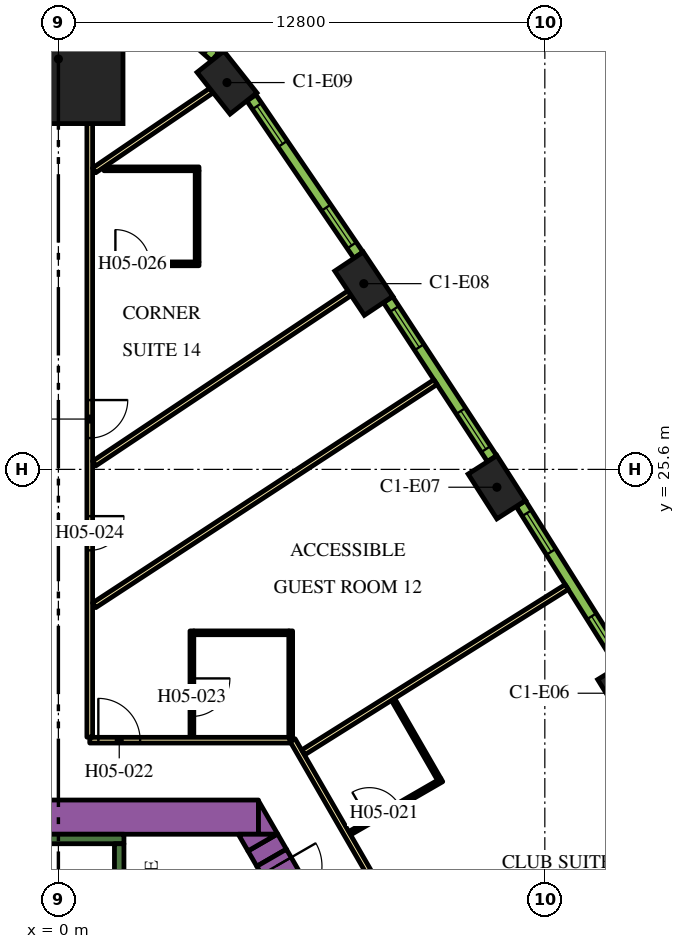
"""IFC4 building model, lengths in metres.
Left out: names, types, materials, properties, quantities, classifications, styles, units other than length and angle.
Written with IfcOpenShell. Run it as: python <this file> out.ifc"""

import sys

from ifc_helpers import new_model, si_unit, direction, frame, frame_2d, origin, origin_2d, place, context, subcontext, project, spatial, polyline, rectangle, outline, extrude, element, fill, save


model = new_model("IFC4")
c1 = context("Model", 3, precision=1e-05, world=origin(), true_north=direction((0.0, 1.0)))
c2 = subcontext(c1, "Body", "Model", "MODEL_VIEW")
j1 = project(units=[si_unit("LENGTHUNIT", "METRE"), si_unit("PLANEANGLEUNIT", "RADIAN")], contexts=[c1])
p1 = place(None, origin())
s1 = spatial("IfcSite", under=j1, at=p1, CompositionType="ELEMENT")
p2 = place(p1, origin())
s2 = spatial("IfcBuilding", under=s1, at=p2, CompositionType="ELEMENT")
p3 = place(p2, frame((0.0, 0.0, 74.4)))
s3 = spatial("IfcBuildingStorey", under=s2, at=p3, CompositionType="ELEMENT", Elevation=74.4)
p4 = place(p3, frame((0.0, 36.399, 0.0), z_axis=(0.0, 0.0, 1.0), x_axis=(0.0, 1.0, 0.0)))
e1 = element("IfcColumn", 1, at=p4, inside=s3, PredefinedType="COLUMN", context=c2, shape_type="SweptSolid", body=[
    extrude(rectangle(XDim=3.4, YDim=3.4, at=origin_2d()), origin(), (0.0, 0.0, 1.0), 3.9),
])
for number, where, z_axis, x_axis in (
    (2, (14.942, 19.71, 0.0), (0.0, 0.0, 1.0), (-0.524, 0.852, 0.0)),
    (3, (11.539, 25.131, 0.0), (0.0, 0.0, 1.0), (-0.539, 0.842, 0.0)),
    (4, (8.037, 30.487, 0.0), (0.0, 0.0, 1.0), (-0.555, 0.832, 0.0)),
    (5, (4.436, 35.778, 0.0), (0.0, 0.0, 1.0), (-0.62, 0.784, 0.0)),
):
    element("IfcColumn", number, at=place(p3, frame(where, z_axis=z_axis, x_axis=x_axis)), inside=s3, PredefinedType="COLUMN", context=c2, shape_type="SweptSolid", body=[
        extrude(rectangle(XDim=1.4, YDim=0.9, at=origin_2d()), origin(), (0.0, 0.0, 1.0), 3.9),
    ])
p5 = place(p3, frame((-4.224, 16.45, 0.0), z_axis=(0.0, 0.0, 1.0), x_axis=(1.0, 0.0, 0.0)))
e6 = element("IfcWall", 6, at=p5, inside=s3, PredefinedType="SOLIDWALL", context=c2, shape_type="SweptSolid", body=[
    extrude(rectangle(XDim=9.488, YDim=0.9, at=frame_2d((4.744, 0.0))), origin(), (0.0, 0.0, 1.0), 3.9),
])
p6 = place(p3, origin())
e7 = element("IfcWall", 7, at=p6, inside=s3, PredefinedType="SOLIDWALL", context=c2, shape_type="SweptSolid", body=[
    extrude(outline(polyline([(5.265, 16.0), (5.265, 16.88), (5.773, 16.0), (5.265, 16.0)])), origin(), (0.0, 0.0, 1.0), 3.9),
])
p7 = place(p3, frame((5.611, 15.382, 0.0), z_axis=(0.0, 0.0, 1.0), x_axis=(-0.500102178127, 0.865966403178, 0.0)))
e8 = element("IfcWall", 8, at=p7, inside=s3, PredefinedType="SOLIDWALL", context=c2, shape_type="SweptSolid", body=[
    extrude(rectangle(XDim=0.464, YDim=0.9, at=frame_2d((0.232, 0.0))), origin(), (0.0, 0.0, 1.0), 3.9),
])
e9 = element("IfcWall", 9, at=p6, inside=s3, PredefinedType="SOLIDWALL", context=c2, shape_type="SweptSolid", body=[
    extrude(outline(polyline([(4.734, 16.0), (5.75, 16.0), (4.988, 15.56), (4.734, 16.0)])), origin(), (0.0, 0.0, 1.0), 3.9),
])
p8 = place(p3, frame((-1.725, 15.875, 0.0), z_axis=(0.0, 0.0, 1.0), x_axis=(1.0, 0.0, 0.0)))
e10 = element("IfcWall", 10, at=p8, inside=s3, PredefinedType="SOLIDWALL", context=c2, shape_type="SweptSolid", body=[
    extrude(rectangle(XDim=3.45, YDim=0.25, at=frame_2d((1.725, 0.0))), origin(), (0.0, 0.0, 1.0), 3.9),
])
p9 = place(p3, frame((1.6, 8.95, 0.0), z_axis=(0.0, 0.0, 1.0), x_axis=(0.0, 1.0, 0.0)))
e11 = element("IfcWall", 11, at=p9, inside=s3, PredefinedType="SOLIDWALL", context=c2, shape_type="SweptSolid", body=[
    extrude(rectangle(XDim=6.8, YDim=0.25, at=frame_2d((3.4, 0.0))), origin(), (0.0, 0.0, 1.0), 3.9),
])
p10 = place(p3, frame((5.611, 15.382, 0.0), z_axis=(0.0, 0.0, 1.0), x_axis=(0.500062241894, -0.865989465428, 0.0)))
e12 = element("IfcWall", 12, at=p10, inside=s3, PredefinedType="SOLIDWALL", context=c2, shape_type="SweptSolid", body=[
    extrude(rectangle(XDim=1.7, YDim=0.9, at=frame_2d((0.85, 0.0))), origin(), (0.0, 0.0, 1.0), 3.9),
])
p11 = place(p10, frame((0.25, 0.0, 0.0)))
e13 = element("IfcOpeningElement", 13, at=p11, cuts=e12, PredefinedType="OPENING", context=c2, shape_type="SweptSolid", body=[
    extrude(rectangle(XDim=1.2, YDim=2.1, at=frame_2d((0.6, 1.05))), frame((0.0, 0.46, 0.0), z_axis=(0.0, -1.0, 0.0), x_axis=(1.0, 0.0, 0.0)), (0.0, 0.0, 1.0), 0.92),
])
p12 = place(p3, frame((6.163, 18.475, 0.0), z_axis=(0.0, 0.0, 1.0), x_axis=(0.500001317485, -0.866024643133, 0.0)))
e14 = element("IfcWall", 14, at=p12, inside=s3, PredefinedType="PARTITIONING", context=c2, shape_type="SweptSolid", body=[
    extrude(rectangle(XDim=25.767, YDim=0.15, at=frame_2d((12.883, 0.0))), origin(), (0.0, 0.0, 1.0), 2.7),
])
p13 = place(p12, frame((21.953, 0.0, 0.0)))
e15 = element("IfcOpeningElement", 15, at=p13, cuts=e14, PredefinedType="OPENING", context=c2, shape_type="SweptSolid", body=[
    extrude(rectangle(XDim=1.0, YDim=2.1, at=frame_2d((0.5, 1.05))), frame((0.0, 0.085, 0.0), z_axis=(0.0, -1.0, 0.0), x_axis=(1.0, 0.0, 0.0)), (0.0, 0.0, 1.0), 0.17),
])
p14 = place(p12, frame((9.948, 0.0, 0.0)))
e16 = element("IfcOpeningElement", 16, at=p14, cuts=e14, PredefinedType="OPENING", context=c2, shape_type="SweptSolid", body=[
    extrude(rectangle(XDim=1.0, YDim=2.1, at=frame_2d((0.5, 1.05))), frame((0.0, 0.085, 0.0), z_axis=(0.0, -1.0, 0.0), x_axis=(1.0, 0.0, 0.0)), (0.0, 0.0, 1.0), 0.17),
])
p15 = place(p12, frame((8.641, 0.0, 0.0)))
e17 = element("IfcOpeningElement", 17, at=p15, cuts=e14, PredefinedType="OPENING", context=c2, shape_type="SweptSolid", body=[
    extrude(rectangle(XDim=1.0, YDim=2.1, at=frame_2d((0.5, 1.05))), frame((0.0, 0.085, 0.0), z_axis=(0.0, -1.0, 0.0), x_axis=(1.0, 0.0, 0.0)), (0.0, 0.0, 1.0), 0.17),
])
p16 = place(p3, frame((0.825, 18.475, 0.0), z_axis=(0.0, 0.0, 1.0), x_axis=(1.0, 0.0, 0.0)))
e18 = element("IfcWall", 18, at=p16, inside=s3, PredefinedType="PARTITIONING", context=c2, shape_type="SweptSolid", body=[
    extrude(rectangle(XDim=5.268, YDim=0.15, at=frame_2d((2.634, 0.0))), origin(), (0.0, 0.0, 1.0), 2.7),
])
p17 = place(p16, frame((0.226, 0.0, 0.0)))
e19 = element("IfcOpeningElement", 19, at=p17, cuts=e18, PredefinedType="OPENING", context=c2, shape_type="SweptSolid", body=[
    extrude(rectangle(XDim=1.1, YDim=2.1, at=frame_2d((0.55, 1.05))), frame((0.0, 0.085, 0.0), z_axis=(0.0, -1.0, 0.0), x_axis=(1.0, 0.0, 0.0)), (0.0, 0.0, 1.0), 0.17),
])
p18 = place(p3, frame((0.825, 34.699, 0.0), z_axis=(0.0, 0.0, 1.0), x_axis=(0.0, -1.0, 0.0)))
e20 = element("IfcWall", 20, at=p18, inside=s3, PredefinedType="PARTITIONING", context=c2, shape_type="SweptSolid", body=[
    extrude(rectangle(XDim=16.144, YDim=0.15, at=frame_2d((8.072, 0.0))), origin(), (0.0, 0.0, 1.0), 2.7),
])
p19 = place(p18, frame((10.329, 0.0, 0.0)))
e21 = element("IfcOpeningElement", 21, at=p19, cuts=e20, PredefinedType="OPENING", context=c2, shape_type="SweptSolid", body=[
    extrude(rectangle(XDim=0.9, YDim=2.1, at=frame_2d((0.45, 1.05))), frame((0.0, 0.085, 0.0), z_axis=(0.0, -1.0, 0.0), x_axis=(1.0, 0.0, 0.0)), (0.0, 0.0, 1.0), 0.17),
])
p20 = place(p18, frame((7.275, 0.0, 0.0)))
e22 = element("IfcOpeningElement", 22, at=p20, cuts=e20, PredefinedType="OPENING", context=c2, shape_type="SweptSolid", body=[
    extrude(rectangle(XDim=1.0, YDim=2.1, at=frame_2d((0.5, 1.05))), frame((0.0, 0.085, 0.0), z_axis=(0.0, -1.0, 0.0), x_axis=(1.0, 0.0, 0.0)), (0.0, 0.0, 1.0), 0.17),
])
p21 = place(p3, frame((9.922, 27.896, 0.0), z_axis=(0.0, 0.0, 1.0), x_axis=(-0.836970816595, -0.547247523675, 0.0)))
e23 = element("IfcWall", 23, at=p21, inside=s3, PredefinedType="PARTITIONING", context=c2, shape_type="SweptSolid", body=[
    extrude(rectangle(XDim=10.729, YDim=0.15, at=frame_2d((5.364, 0.0))), origin(), (0.0, 0.0, 1.0), 2.7),
])
p22 = place(p3, frame((7.662, 30.238, 0.0), z_axis=(0.0, 0.0, 1.0), x_axis=(-0.831882886825, -0.554951225431, 0.0)))
e24 = element("IfcWall", 24, at=p22, inside=s3, PredefinedType="PARTITIONING", context=c2, shape_type="SweptSolid", body=[
    extrude(rectangle(XDim=8.079, YDim=0.15, at=frame_2d((4.04, 0.0))), origin(), (0.0, 0.0, 1.0), 2.7),
])
p23 = place(p3, frame((4.028, 35.569, 0.0), z_axis=(0.0, 0.0, 1.0), x_axis=(-0.826700206326, -0.56264266534, 0.0)))
e25 = element("IfcWall", 25, at=p23, inside=s3, PredefinedType="PARTITIONING", context=c2, shape_type="SweptSolid", body=[
    extrude(rectangle(XDim=3.733, YDim=0.15, at=frame_2d((1.867, 0.0))), origin(), (0.0, 0.0, 1.0), 2.7),
])
p24 = place(p3, frame((13.376, 22.506, 0.0), z_axis=(0.0, 0.0, 1.0), x_axis=(-0.846945608893, -0.531679542183, 0.0)))
e26 = element("IfcWall", 26, at=p24, inside=s3, PredefinedType="PARTITIONING", context=c2, shape_type="SweptSolid", body=[
    extrude(rectangle(XDim=8.182, YDim=0.15, at=frame_2d((4.091, 0.0))), origin(), (0.0, 0.0, 1.0), 2.7),
])
p25 = place(p3, frame((7.664, 16.026, 0.0), z_axis=(0.0, 0.0, 1.0), x_axis=(0.866034573852, 0.49998411664, 0.0)))
e27 = element("IfcWall", 27, at=p25, inside=s3, PredefinedType="PARTITIONING", context=c2, shape_type="SweptSolid", body=[
    extrude(rectangle(XDim=2.8, YDim=0.1, at=frame_2d((1.4, 0.0))), origin(), (0.0, 0.0, 1.0), 2.7),
])
p26 = place(p25, frame((0.6, 0.0, 0.0)))
e28 = element("IfcOpeningElement", 28, at=p26, cuts=e27, PredefinedType="OPENING", context=c2, shape_type="SweptSolid", body=[
    extrude(rectangle(XDim=0.9, YDim=2.1, at=frame_2d((0.45, 1.05))), frame((0.0, 0.06, 0.0), z_axis=(0.0, -1.0, 0.0), x_axis=(1.0, 0.0, 0.0)), (0.0, 0.0, 1.0), 0.12),
])
p27 = place(p3, frame((10.02, 17.444, 0.0), z_axis=(0.0, 0.0, 1.0), x_axis=(-0.499958230738, 0.866049517936, 0.0)))
e29 = element("IfcWall", 29, at=p27, inside=s3, PredefinedType="PARTITIONING", context=c2, shape_type="SweptSolid", body=[
    extrude(rectangle(XDim=2.42, YDim=0.1, at=frame_2d((1.21, 0.0))), origin(), (0.0, 0.0, 1.0), 2.7),
])
p28 = place(p3, frame((3.513, 21.35, 0.0), z_axis=(0.0, 0.0, 1.0), x_axis=(0.0, -1.0, 0.0)))
e30 = element("IfcWall", 30, at=p28, inside=s3, PredefinedType="PARTITIONING", context=c2, shape_type="SweptSolid", body=[
    extrude(rectangle(XDim=2.8, YDim=0.1, at=frame_2d((1.4, 0.0))), origin(), (0.0, 0.0, 1.0), 2.7),
])
p29 = place(p28, frame((1.25, 0.0, 0.0)))
e31 = element("IfcOpeningElement", 31, at=p29, cuts=e30, PredefinedType="OPENING", context=c2, shape_type="SweptSolid", body=[
    extrude(rectangle(XDim=1.0, YDim=2.1, at=frame_2d((0.5, 1.05))), frame((0.0, 0.06, 0.0), z_axis=(0.0, -1.0, 0.0), x_axis=(1.0, 0.0, 0.0)), (0.0, 0.0, 1.0), 0.12),
])
p30 = place(p3, frame((3.563, 21.3, 0.0), z_axis=(0.0, 0.0, 1.0), x_axis=(1.0, 0.0, 0.0)))
e32 = element("IfcWall", 32, at=p30, inside=s3, PredefinedType="PARTITIONING", context=c2, shape_type="SweptSolid", body=[
    extrude(rectangle(XDim=2.5, YDim=0.1, at=frame_2d((1.25, 0.0))), origin(), (0.0, 0.0, 1.0), 2.7),
])
p31 = place(p3, frame((6.113, 18.55, 0.0), z_axis=(0.0, 0.0, 1.0), x_axis=(0.0, 1.0, 0.0)))
e33 = element("IfcWall", 33, at=p31, inside=s3, PredefinedType="PARTITIONING", context=c2, shape_type="SweptSolid", body=[
    extrude(rectangle(XDim=2.8, YDim=0.1, at=frame_2d((1.4, 0.0))), origin(), (0.0, 0.0, 1.0), 2.7),
])
p32 = place(p3, frame((0.9, 31.009, 0.0), z_axis=(0.0, 0.0, 1.0), x_axis=(1.0, 0.0, 0.0)))
e34 = element("IfcWall", 34, at=p32, inside=s3, PredefinedType="PARTITIONING", context=c2, shape_type="SweptSolid", body=[
    extrude(rectangle(XDim=2.8, YDim=0.1, at=frame_2d((1.4, 0.0))), origin(), (0.0, 0.0, 1.0), 2.7),
])
p33 = place(p32, frame((0.6, 0.0, 0.0)))
e35 = element("IfcOpeningElement", 35, at=p33, cuts=e34, PredefinedType="OPENING", context=c2, shape_type="SweptSolid", body=[
    extrude(rectangle(XDim=0.9, YDim=2.1, at=frame_2d((0.45, 1.05))), frame((0.0, 0.06, 0.0), z_axis=(0.0, -1.0, 0.0), x_axis=(1.0, 0.0, 0.0)), (0.0, 0.0, 1.0), 0.12),
])
p34 = place(p3, frame((3.65, 31.059, 0.0), z_axis=(0.0, 0.0, 1.0), x_axis=(0.0, 1.0, 0.0)))
e36 = element("IfcWall", 36, at=p34, inside=s3, PredefinedType="PARTITIONING", context=c2, shape_type="SweptSolid", body=[
    extrude(rectangle(XDim=2.4, YDim=0.1, at=frame_2d((1.2, 0.0))), origin(), (0.0, 0.0, 1.0), 2.7),
])
p35 = place(p3, frame((1.2, 33.509, 0.0), z_axis=(0.0, 0.0, 1.0), x_axis=(1.0, 0.0, 0.0)))
e37 = element("IfcWall", 37, at=p35, inside=s3, PredefinedType="PARTITIONING", context=c2, shape_type="SweptSolid", body=[
    extrude(rectangle(XDim=2.5, YDim=0.1, at=frame_2d((1.25, 0.0))), origin(), (0.0, 0.0, 1.0), 2.7),
])
p36 = place(p3, frame((14.827, 20.466, 0.0), z_axis=(0.0, 0.0, 1.0), x_axis=(-0.531688286542, 0.846940119462, 0.0)))
e38 = element("IfcWall", 38, at=p36, inside=s3, PredefinedType="SOLIDWALL", context=c2, shape_type="SweptSolid", body=[
    extrude(rectangle(XDim=4.998, YDim=0.29, at=frame_2d((2.499, 0.0))), origin(), (0.0, 0.0, 1.0), 3.6),
])
p37 = place(p36, frame((0.297, 0.0, 0.9)))
e39 = element("IfcOpeningElement", 39, at=p37, cuts=e38, PredefinedType="OPENING", context=c2, shape_type="SweptSolid", body=[
    extrude(rectangle(XDim=1.2, YDim=2.15, at=frame_2d((0.6, 1.075))), frame((0.0, 0.155, 0.0), z_axis=(0.0, -1.0, 0.0), x_axis=(1.0, 0.0, 0.0)), (0.0, 0.0, 1.0), 0.31),
])
p38 = place(p36, frame((3.501, 0.0, 0.9)))
e40 = element("IfcOpeningElement", 40, at=p38, cuts=e38, PredefinedType="OPENING", context=c2, shape_type="SweptSolid", body=[
    extrude(rectangle(XDim=1.2, YDim=2.15, at=frame_2d((0.6, 1.075))), frame((0.0, 0.155, 0.0), z_axis=(0.0, -1.0, 0.0), x_axis=(1.0, 0.0, 0.0)), (0.0, 0.0, 1.0), 0.31),
])
p39 = place(p3, frame((11.411, 25.884, 0.0), z_axis=(0.0, 0.0, 1.0), x_axis=(-0.547204617628, 0.836998868845, 0.0)))
e41 = element("IfcWall", 41, at=p39, inside=s3, PredefinedType="SOLIDWALL", context=c2, shape_type="SweptSolid", body=[
    extrude(rectangle(XDim=4.998, YDim=0.29, at=frame_2d((2.499, 0.0))), origin(), (0.0, 0.0, 1.0), 3.6),
])
p40 = place(p39, frame((0.297, 0.0, 0.9)))
e42 = element("IfcOpeningElement", 42, at=p40, cuts=e41, PredefinedType="OPENING", context=c2, shape_type="SweptSolid", body=[
    extrude(rectangle(XDim=1.2, YDim=2.15, at=frame_2d((0.6, 1.075))), frame((0.0, 0.155, 0.0), z_axis=(0.0, -1.0, 0.0), x_axis=(1.0, 0.0, 0.0)), (0.0, 0.0, 1.0), 0.31),
])
p41 = place(p39, frame((3.501, 0.0, 0.9)))
e43 = element("IfcOpeningElement", 43, at=p41, cuts=e41, PredefinedType="OPENING", context=c2, shape_type="SweptSolid", body=[
    extrude(rectangle(XDim=1.2, YDim=2.15, at=frame_2d((0.6, 1.075))), frame((0.0, 0.155, 0.0), z_axis=(0.0, -1.0, 0.0), x_axis=(1.0, 0.0, 0.0)), (0.0, 0.0, 1.0), 0.31),
])
p42 = place(p3, frame((7.895, 31.238, 0.0), z_axis=(0.0, 0.0, 1.0), x_axis=(-0.562610153679, 0.826722332454, 0.0)))
e44 = element("IfcWall", 44, at=p42, inside=s3, PredefinedType="SOLIDWALL", context=c2, shape_type="SweptSolid", body=[
    extrude(rectangle(XDim=5.006, YDim=0.29, at=frame_2d((2.503, 0.0))), origin(), (0.0, 0.0, 1.0), 3.6),
])
p43 = place(p42, frame((0.31, 0.0, 0.9)))
e45 = element("IfcOpeningElement", 45, at=p43, cuts=e44, PredefinedType="OPENING", context=c2, shape_type="SweptSolid", body=[
    extrude(rectangle(XDim=1.2, YDim=2.15, at=frame_2d((0.6, 1.075))), frame((0.0, 0.155, 0.0), z_axis=(0.0, -1.0, 0.0), x_axis=(1.0, 0.0, 0.0)), (0.0, 0.0, 1.0), 0.31),
])
p44 = place(p42, frame((3.541, 0.0, 0.9)))
e46 = element("IfcOpeningElement", 46, at=p44, cuts=e44, PredefinedType="OPENING", context=c2, shape_type="SweptSolid", body=[
    extrude(rectangle(XDim=1.2, YDim=2.15, at=frame_2d((0.6, 1.075))), frame((0.0, 0.155, 0.0), z_axis=(0.0, -1.0, 0.0), x_axis=(1.0, 0.0, 0.0)), (0.0, 0.0, 1.0), 0.31),
])
p45 = place(p3, frame((4.125, 36.459, 0.0), z_axis=(0.0, 0.0, 1.0), x_axis=(-0.749812680302, 0.661650167731, 0.0)))
e47 = element("IfcWall", 47, at=p45, inside=s3, PredefinedType="SOLIDWALL", context=c2, shape_type="SweptSolid", body=[
    extrude(rectangle(XDim=1.415, YDim=0.29, at=frame_2d((0.708, 0.0))), origin(), (0.0, 0.0, 1.0), 3.6),
])
p46 = place(p45, frame((0.258, 0.0, 0.9)))
e48 = element("IfcOpeningElement", 48, at=p46, cuts=e47, PredefinedType="OPENING", context=c2, shape_type="SweptSolid", body=[
    extrude(rectangle(XDim=0.9, YDim=2.15, at=frame_2d((0.45, 1.075))), frame((0.0, 0.155, 0.0), z_axis=(0.0, -1.0, 0.0), x_axis=(1.0, 0.0, 0.0)), (0.0, 0.0, 1.0), 0.31),
])
p47 = place(p11, origin())
e49 = element("IfcDoor", 49, at=p47, inside=s3, OperationType="SINGLE_SWING_LEFT", PredefinedType="DOOR", context=c2, shape_type="SweptSolid", body=[
    extrude(rectangle(XDim=1.2, YDim=2.1, at=frame_2d((0.6, 1.05))), frame((0.0, 0.025, 0.0), z_axis=(0.0, -1.0, 0.0), x_axis=(1.0, 0.0, 0.0)), (0.0, 0.0, 1.0), 0.05),
])
fill(e13, e49)
p48 = place(p26, origin())
e50 = element("IfcDoor", 50, at=p48, inside=s3, OperationType="SINGLE_SWING_LEFT", PredefinedType="DOOR", context=c2, shape_type="SweptSolid", body=[
    extrude(rectangle(XDim=0.9, YDim=2.1, at=frame_2d((0.45, 1.05))), frame((0.0, 0.025, 0.0), z_axis=(0.0, -1.0, 0.0), x_axis=(1.0, 0.0, 0.0)), (0.0, 0.0, 1.0), 0.05),
])
fill(e28, e50)
p49 = place(p17, origin())
e51 = element("IfcDoor", 51, at=p49, inside=s3, OperationType="SINGLE_SWING_LEFT", PredefinedType="DOOR", context=c2, shape_type="SweptSolid", body=[
    extrude(rectangle(XDim=1.1, YDim=2.1, at=frame_2d((0.55, 1.05))), frame((0.0, 0.025, 0.0), z_axis=(0.0, -1.0, 0.0), x_axis=(1.0, 0.0, 0.0)), (0.0, 0.0, 1.0), 0.05),
])
fill(e19, e51)
p50 = place(p29, origin())
e52 = element("IfcDoor", 52, at=p50, inside=s3, OperationType="SINGLE_SWING_RIGHT", PredefinedType="DOOR", context=c2, shape_type="SweptSolid", body=[
    extrude(rectangle(XDim=1.0, YDim=2.1, at=frame_2d((0.5, 1.05))), frame((0.0, 0.025, 0.0), z_axis=(0.0, -1.0, 0.0), x_axis=(1.0, 0.0, 0.0)), (0.0, 0.0, 1.0), 0.05),
])
fill(e31, e52)
p51 = place(p19, origin())
e53 = element("IfcDoor", 53, at=p51, inside=s3, OperationType="SINGLE_SWING_LEFT", PredefinedType="DOOR", context=c2, shape_type="SweptSolid", body=[
    extrude(rectangle(XDim=0.9, YDim=2.1, at=frame_2d((0.45, 1.05))), frame((0.0, 0.025, 0.0), z_axis=(0.0, -1.0, 0.0), x_axis=(1.0, 0.0, 0.0)), (0.0, 0.0, 1.0), 0.05),
])
fill(e21, e53)
p52 = place(p20, origin())
e54 = element("IfcDoor", 54, at=p52, inside=s3, OperationType="SINGLE_SWING_RIGHT", PredefinedType="DOOR", context=c2, shape_type="SweptSolid", body=[
    extrude(rectangle(XDim=1.0, YDim=2.1, at=frame_2d((0.5, 1.05))), frame((0.0, 0.025, 0.0), z_axis=(0.0, -1.0, 0.0), x_axis=(1.0, 0.0, 0.0)), (0.0, 0.0, 1.0), 0.05),
])
fill(e22, e54)
p53 = place(p33, origin())
e55 = element("IfcDoor", 55, at=p53, inside=s3, OperationType="SINGLE_SWING_LEFT", PredefinedType="DOOR", context=c2, shape_type="SweptSolid", body=[
    extrude(rectangle(XDim=0.9, YDim=2.1, at=frame_2d((0.45, 1.05))), frame((0.0, 0.025, 0.0), z_axis=(0.0, -1.0, 0.0), x_axis=(1.0, 0.0, 0.0)), (0.0, 0.0, 1.0), 0.05),
])
fill(e35, e55)
p54 = place(p37, origin())
e56 = element("IfcWindow", 56, at=p54, inside=s3, PartitioningType="DOUBLE_PANEL_VERTICAL", PredefinedType="WINDOW", context=c2, shape_type="SweptSolid", body=[
    extrude(rectangle(XDim=1.2, YDim=2.15, at=frame_2d((0.6, 1.075))), frame((0.0, 0.015, 0.0), z_axis=(0.0, -1.0, 0.0), x_axis=(1.0, 0.0, 0.0)), (0.0, 0.0, 1.0), 0.06),
])
fill(e39, e56)
p55 = place(p38, origin())
e57 = element("IfcWindow", 57, at=p55, inside=s3, PartitioningType="DOUBLE_PANEL_VERTICAL", PredefinedType="WINDOW", context=c2, shape_type="SweptSolid", body=[
    extrude(rectangle(XDim=1.2, YDim=2.15, at=frame_2d((0.6, 1.075))), frame((0.0, 0.015, 0.0), z_axis=(0.0, -1.0, 0.0), x_axis=(1.0, 0.0, 0.0)), (0.0, 0.0, 1.0), 0.06),
])
fill(e40, e57)
p56 = place(p40, origin())
e58 = element("IfcWindow", 58, at=p56, inside=s3, PartitioningType="DOUBLE_PANEL_VERTICAL", PredefinedType="WINDOW", context=c2, shape_type="SweptSolid", body=[
    extrude(rectangle(XDim=1.2, YDim=2.15, at=frame_2d((0.6, 1.075))), frame((0.0, 0.015, 0.0), z_axis=(0.0, -1.0, 0.0), x_axis=(1.0, 0.0, 0.0)), (0.0, 0.0, 1.0), 0.06),
])
fill(e42, e58)
p57 = place(p41, origin())
e59 = element("IfcWindow", 59, at=p57, inside=s3, PartitioningType="DOUBLE_PANEL_VERTICAL", PredefinedType="WINDOW", context=c2, shape_type="SweptSolid", body=[
    extrude(rectangle(XDim=1.2, YDim=2.15, at=frame_2d((0.6, 1.075))), frame((0.0, 0.015, 0.0), z_axis=(0.0, -1.0, 0.0), x_axis=(1.0, 0.0, 0.0)), (0.0, 0.0, 1.0), 0.06),
])
fill(e43, e59)
p58 = place(p43, origin())
e60 = element("IfcWindow", 60, at=p58, inside=s3, PartitioningType="DOUBLE_PANEL_VERTICAL", PredefinedType="WINDOW", context=c2, shape_type="SweptSolid", body=[
    extrude(rectangle(XDim=1.2, YDim=2.15, at=frame_2d((0.6, 1.075))), frame((0.0, 0.015, 0.0), z_axis=(0.0, -1.0, 0.0), x_axis=(1.0, 0.0, 0.0)), (0.0, 0.0, 1.0), 0.06),
])
fill(e45, e60)
p59 = place(p44, origin())
e61 = element("IfcWindow", 61, at=p59, inside=s3, PartitioningType="DOUBLE_PANEL_VERTICAL", PredefinedType="WINDOW", context=c2, shape_type="SweptSolid", body=[
    extrude(rectangle(XDim=1.2, YDim=2.15, at=frame_2d((0.6, 1.075))), frame((0.0, 0.015, 0.0), z_axis=(0.0, -1.0, 0.0), x_axis=(1.0, 0.0, 0.0)), (0.0, 0.0, 1.0), 0.06),
])
fill(e46, e61)
save(model, sys.argv[1])
